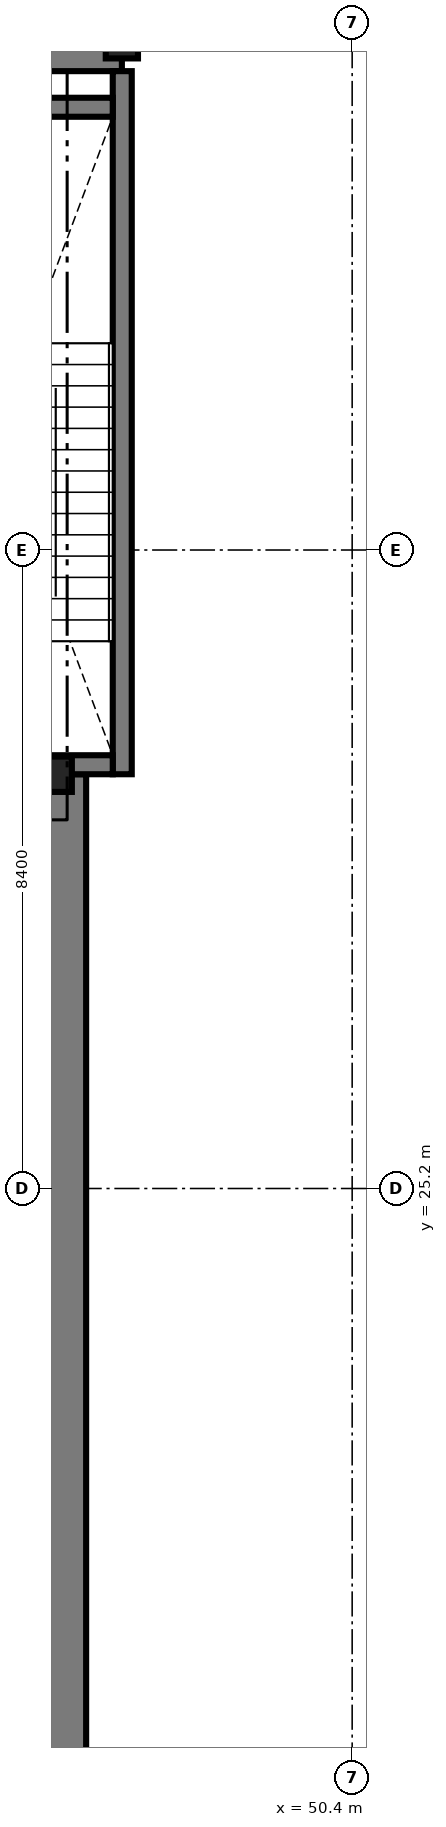
"""IFC4 building model, lengths in metres.
Left out: names, types, materials, properties, quantities, classifications, styles, units other than length and angle.
Written with IfcOpenShell. Run it as: python <this file> out.ifc"""

import sys

from ifc_helpers import new_model, si_unit, direction, frame, frame_2d, origin, origin_2d, place, context, subcontext, project, spatial, rectangle, i_section, extrude, source, transform, mapped, element, save


model = new_model("IFC4")
c1 = context("Model", 3, precision=1e-05, world=origin(), true_north=direction((0.0, 1.0)))
c2 = subcontext(c1, "Body", "Model", "MODEL_VIEW")
j1 = project(units=[si_unit("LENGTHUNIT", "METRE"), si_unit("PLANEANGLEUNIT", "RADIAN")], contexts=[c1])
p1 = place(None, origin())
s1 = spatial("IfcSite", under=j1, at=p1, CompositionType="ELEMENT")
p2 = place(p1, origin())
s2 = spatial("IfcBuilding", under=s1, at=p2, CompositionType="ELEMENT")
p3 = place(p2, frame((0.0, 0.0, 166.8)))
s3 = spatial("IfcBuildingStorey", under=s2, at=p3, CompositionType="ELEMENT", Elevation=166.8)
m1 = source(origin(), c2, "Body", "SweptSolid", [
    extrude(rectangle(XDim=17.52, YDim=0.8, at=frame_2d((8.76, 0.0))), origin(), (0.0, 0.0, 1.0), 4.75),
])
p4 = place(p3, frame((29.85, 40.3, 0.0), z_axis=(0.0, 0.0, 1.0), x_axis=(1.0, 0.0, 0.0)))
e1 = element("IfcWall", 1, at=p4, inside=s3, PredefinedType="SHEAR", context=c2, shape_type="MappedRepresentation", body=[
    mapped(m1, transform((0.0, 0.0, 0.0), scale=1.0)),
])
m2 = source(origin(), c2, "Body", "SweptSolid", [
    extrude(rectangle(XDim=13.15, YDim=0.8, at=frame_2d((6.575, 0.0))), origin(), (0.0, 0.0, 1.0), 4.75),
])
p5 = place(p3, frame((46.5, 17.5, 0.0), z_axis=(0.0, 0.0, 1.0), x_axis=(0.0, 1.0, 0.0)))
e2 = element("IfcWall", 2, at=p5, inside=s3, PredefinedType="SHEAR", context=c2, shape_type="MappedRepresentation", body=[
    mapped(m2, transform((0.0, 0.0, 0.0), scale=1.0)),
])
m3 = source(origin(), c2, "Body", "SweptSolid", [
    extrude(i_section(OverallWidth=0.424, OverallDepth=0.465, WebThickness=0.035, FlangeThickness=0.056, FilletRadius=0.015, at=origin_2d()), origin(), (0.0, 0.0, 1.0), 4.75),
])
for number, where, z_axis, x_axis in (
    (3, (46.5, 30.65, 0.0), (0.0, 0.0, 1.0), (1.0, 0.0, 0.0)),
    (4, (47.37, 40.3, 0.0), (0.0, 0.0, 1.0), (1.0, 0.0, 0.0)),
):
    element("IfcColumn", number, at=place(p3, frame(where, z_axis=z_axis, x_axis=x_axis)), inside=s3, PredefinedType="COLUMN", context=c2, shape_type="MappedRepresentation", body=[
        mapped(m3, transform((0.0, 0.0, 0.0), scale=1.0)),
    ])
m4 = source(origin(), c2, "Body", "SweptSolid", [
    extrude(rectangle(XDim=9.25, YDim=0.25, at=frame_2d((4.625, 0.0))), origin(), (0.0, 0.0, 1.0), 5.2),
])
p6 = place(p3, frame((47.375, 30.65, 0.0), z_axis=(0.0, 0.0, 1.0), x_axis=(0.0, 1.0, 0.0)))
e5 = element("IfcWall", 5, at=p6, inside=s3, PredefinedType="SOLIDWALL", context=c2, shape_type="MappedRepresentation", body=[
    mapped(m4, transform((0.0, 0.0, 0.0), scale=1.0)),
])
m5 = source(origin(), c2, "Body", "SweptSolid", [
    extrude(rectangle(XDim=3.15, YDim=0.25, at=frame_2d((1.575, 0.0))), origin(), (0.0, 0.0, 1.0), 5.2),
])
p7 = place(p3, frame((44.1, 39.425, 0.0), z_axis=(0.0, 0.0, 1.0), x_axis=(1.0, 0.0, 0.0)))
e6 = element("IfcWall", 6, at=p7, inside=s3, PredefinedType="SOLIDWALL", context=c2, shape_type="MappedRepresentation", body=[
    mapped(m5, transform((0.0, 0.0, 0.0), scale=1.0)),
])
p8 = place(p3, frame((44.1, 30.775, 0.0), z_axis=(0.0, 0.0, 1.0), x_axis=(1.0, 0.0, 0.0)))
e7 = element("IfcWall", 7, at=p8, inside=s3, PredefinedType="SOLIDWALL", context=c2, shape_type="MappedRepresentation", body=[
    mapped(m5, transform((0.0, 0.0, 0.0), scale=1.0)),
])
m6 = source(origin(), c2, "Body", "SweptSolid", [
    extrude(rectangle(XDim=1.1, YDim=2.2, at=frame_2d((0.55, 1.1))), frame((0.0, 0.135, 0.0), z_axis=(0.0, -1.0, 0.0), x_axis=(1.0, 0.0, 0.0)), (0.0, 0.0, 1.0), 0.27),
])
p9 = place(p8, frame((0.35, 0.0, 0.0)))
e8 = element("IfcOpeningElement", 8, at=p9, cuts=e7, PredefinedType="OPENING", context=c2, shape_type="MappedRepresentation", body=[
    mapped(m6, transform((0.0, 0.0, 0.0), scale=1.0)),
])
save(model, sys.argv[1])
